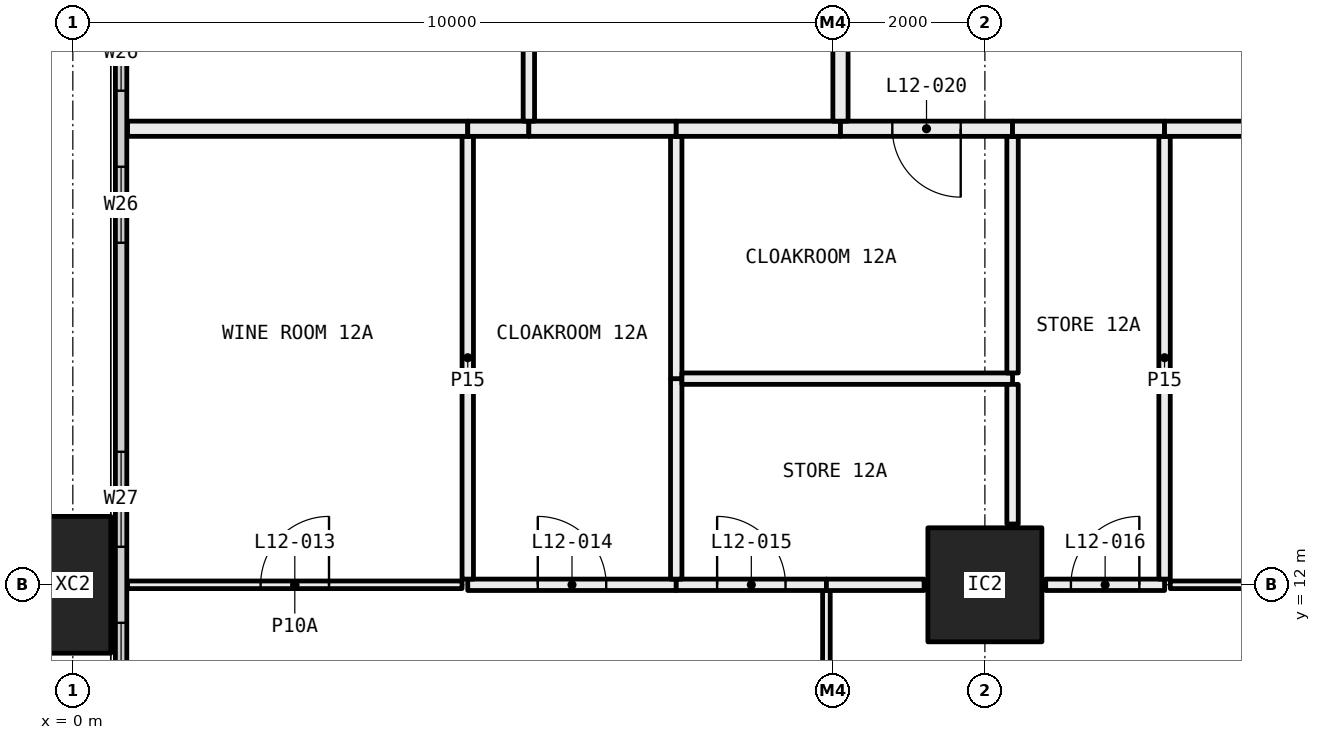
"""IFC4 building model, lengths in metres.
Left out: names, types, materials, properties, quantities, classifications, styles, units other than length and angle.
Written with IfcOpenShell. Run it as: python <this file> out.ifc"""

import sys

from ifc_helpers import new_model, si_unit, direction, frame, frame_2d, origin, origin_2d, place, context, subcontext, project, spatial, rectangle, hollow_rectangle, extrude, element, fill, save


model = new_model("IFC4")
c1 = context("Model", 3, precision=1e-05, world=origin(), true_north=direction((0.0, 1.0)))
c2 = subcontext(c1, "Body", "Model", "MODEL_VIEW")
j1 = project(units=[si_unit("LENGTHUNIT", "METRE"), si_unit("PLANEANGLEUNIT", "RADIAN")], contexts=[c1])
p1 = place(None, origin())
s1 = spatial("IfcSite", under=j1, at=p1, CompositionType="ELEMENT")
p2 = place(p1, origin())
s2 = spatial("IfcBuilding", under=s1, at=p2, CompositionType="ELEMENT")
p3 = place(p2, frame((0.0, 0.0, 54.15)))
s3 = spatial("IfcBuildingStorey", under=s2, at=p3, CompositionType="ELEMENT", Elevation=54.15)
p4 = place(p3, frame((0.0, 12.0, -0.4), z_axis=(0.0, 0.0, 1.0), x_axis=(0.0, 1.0, 0.0)))
e1 = element("IfcColumn", 1, at=p4, inside=s3, PredefinedType="COLUMN", context=c2, shape_type="SweptSolid", body=[
    extrude(hollow_rectangle(XDim=1.8, YDim=1.0, WallThickness=0.07, at=origin_2d()), origin(), (0.0, 0.0, 1.0), 3.45),
])
p5 = place(p3, frame((12.0, 12.0, 0.0), z_axis=(0.0, 0.0, 1.0), x_axis=(1.0, 0.0, 0.0)))
e2 = element("IfcColumn", 2, at=p5, inside=s3, PredefinedType="COLUMN", context=c2, shape_type="SweptSolid", body=[
    extrude(hollow_rectangle(XDim=1.5, YDim=1.5, WallThickness=0.065, at=origin_2d()), origin(), (0.0, 0.0, 1.0), 3.05),
])
p6 = place(p3, frame((0.635, 6.71, 0.0), z_axis=(0.0, 0.0, 1.0), x_axis=(0.0, 1.0, 0.0)))
e3 = element("IfcWall", 3, at=p6, inside=s3, PredefinedType="ELEMENTEDWALL", context=c2, shape_type="SweptSolid", body=[
    extrude(rectangle(XDim=34.58, YDim=0.15, at=frame_2d((17.29, 0.0))), origin(), (0.0, 0.0, 1.0), 3.05),
])
p7 = place(p6, frame((0.29, 0.0, 0.45)))
e4 = element("IfcOpeningElement", 4, at=p7, cuts=e3, PredefinedType="OPENING", context=c2, shape_type="SweptSolid", body=[
    extrude(rectangle(XDim=4.5, YDim=2.55, at=frame_2d((2.25, 1.275))), frame((0.0, 0.085, 0.0), z_axis=(0.0, -1.0, 0.0), x_axis=(1.0, 0.0, 0.0)), (0.0, 0.0, 1.0), 0.17),
])
p8 = place(p6, frame((5.79, 0.0, 0.45)))
e5 = element("IfcOpeningElement", 5, at=p8, cuts=e3, PredefinedType="OPENING", context=c2, shape_type="SweptSolid", body=[
    extrude(rectangle(XDim=1.25, YDim=2.55, at=frame_2d((0.625, 1.275))), frame((0.0, 0.085, 0.0), z_axis=(0.0, -1.0, 0.0), x_axis=(1.0, 0.0, 0.0)), (0.0, 0.0, 1.0), 0.17),
])
p9 = place(p6, frame((9.79, 0.0, 0.45)))
e6 = element("IfcOpeningElement", 6, at=p9, cuts=e3, PredefinedType="OPENING", context=c2, shape_type="SweptSolid", body=[
    extrude(rectangle(XDim=1.0, YDim=2.55, at=frame_2d((0.5, 1.275))), frame((0.0, 0.085, 0.0), z_axis=(0.0, -1.0, 0.0), x_axis=(1.0, 0.0, 0.0)), (0.0, 0.0, 1.0), 0.17),
])
p10 = place(p6, frame((11.79, 0.0, 0.45)))
e7 = element("IfcOpeningElement", 7, at=p10, cuts=e3, PredefinedType="OPENING", context=c2, shape_type="SweptSolid", body=[
    extrude(rectangle(XDim=1.0, YDim=2.55, at=frame_2d((0.5, 1.275))), frame((0.0, 0.085, 0.0), z_axis=(0.0, -1.0, 0.0), x_axis=(1.0, 0.0, 0.0)), (0.0, 0.0, 1.0), 0.17),
])
p11 = place(p6, frame((15.54, 0.0, 0.45)))
e8 = element("IfcOpeningElement", 8, at=p11, cuts=e3, PredefinedType="OPENING", context=c2, shape_type="SweptSolid", body=[
    extrude(rectangle(XDim=1.25, YDim=2.55, at=frame_2d((0.625, 1.275))), frame((0.0, 0.085, 0.0), z_axis=(0.0, -1.0, 0.0), x_axis=(1.0, 0.0, 0.0)), (0.0, 0.0, 1.0), 0.17),
])
p12 = place(p6, frame((17.79, 0.0, 0.45)))
e9 = element("IfcOpeningElement", 9, at=p12, cuts=e3, PredefinedType="OPENING", context=c2, shape_type="SweptSolid", body=[
    extrude(rectangle(XDim=1.25, YDim=2.55, at=frame_2d((0.625, 1.275))), frame((0.0, 0.085, 0.0), z_axis=(0.0, -1.0, 0.0), x_axis=(1.0, 0.0, 0.0)), (0.0, 0.0, 1.0), 0.17),
])
p13 = place(p6, frame((21.79, 0.0, 0.45)))
e10 = element("IfcOpeningElement", 10, at=p13, cuts=e3, PredefinedType="OPENING", context=c2, shape_type="SweptSolid", body=[
    extrude(rectangle(XDim=1.0, YDim=2.55, at=frame_2d((0.5, 1.275))), frame((0.0, 0.085, 0.0), z_axis=(0.0, -1.0, 0.0), x_axis=(1.0, 0.0, 0.0)), (0.0, 0.0, 1.0), 0.17),
])
p14 = place(p6, frame((23.79, 0.0, 0.45)))
e11 = element("IfcOpeningElement", 11, at=p14, cuts=e3, PredefinedType="OPENING", context=c2, shape_type="SweptSolid", body=[
    extrude(rectangle(XDim=1.0, YDim=2.55, at=frame_2d((0.5, 1.275))), frame((0.0, 0.085, 0.0), z_axis=(0.0, -1.0, 0.0), x_axis=(1.0, 0.0, 0.0)), (0.0, 0.0, 1.0), 0.17),
])
p15 = place(p6, frame((27.54, 0.0, 0.45)))
e12 = element("IfcOpeningElement", 12, at=p15, cuts=e3, PredefinedType="OPENING", context=c2, shape_type="SweptSolid", body=[
    extrude(rectangle(XDim=1.25, YDim=2.55, at=frame_2d((0.625, 1.275))), frame((0.0, 0.085, 0.0), z_axis=(0.0, -1.0, 0.0), x_axis=(1.0, 0.0, 0.0)), (0.0, 0.0, 1.0), 0.17),
])
p16 = place(p6, frame((29.79, 0.0, 0.45)))
e13 = element("IfcOpeningElement", 13, at=p16, cuts=e3, PredefinedType="OPENING", context=c2, shape_type="SweptSolid", body=[
    extrude(rectangle(XDim=4.5, YDim=2.55, at=frame_2d((2.25, 1.275))), frame((0.0, 0.085, 0.0), z_axis=(0.0, -1.0, 0.0), x_axis=(1.0, 0.0, 0.0)), (0.0, 0.0, 1.0), 0.17),
])
p17 = place(p3, frame((9.915, 6.05, 0.0), z_axis=(0.0, 0.0, 1.0), x_axis=(0.0, 1.0, 0.0)))
e14 = element("IfcWall", 14, at=p17, inside=s3, PredefinedType="PARTITIONING", context=c2, shape_type="SweptSolid", body=[
    extrude(rectangle(XDim=5.875, YDim=0.1, at=frame_2d((2.938, 0.0))), origin(), (0.0, 0.0, 1.0), 2.45),
])
p18 = place(p17, frame((2.488, 0.0, 0.0)))
e15 = element("IfcOpeningElement", 15, at=p18, cuts=e14, PredefinedType="OPENING", context=c2, shape_type="SweptSolid", body=[
    extrude(rectangle(XDim=0.9, YDim=2.1, at=frame_2d((0.45, 1.05))), frame((0.0, 0.06, 0.0), z_axis=(0.0, -1.0, 0.0), x_axis=(1.0, 0.0, 0.0)), (0.0, 0.0, 1.0), 0.12),
])
p19 = place(p3, frame((5.121, 12.0, 0.0), z_axis=(0.0, 0.0, 1.0), x_axis=(-1.0, 0.0, 0.0)))
e16 = element("IfcWall", 16, at=p19, inside=s3, PredefinedType="PARTITIONING", context=c2, shape_type="SweptSolid", body=[
    extrude(rectangle(XDim=4.401, YDim=0.1, at=frame_2d((2.201, 0.0))), origin(), (0.0, 0.0, 1.0), 2.45),
])
p20 = place(p19, frame((1.75, 0.0, 0.0)))
e17 = element("IfcOpeningElement", 17, at=p20, cuts=e16, PredefinedType="OPENING", context=c2, shape_type="SweptSolid", body=[
    extrude(rectangle(XDim=0.9, YDim=2.1, at=frame_2d((0.45, 1.05))), frame((0.0, 0.06, 0.0), z_axis=(0.0, -1.0, 0.0), x_axis=(1.0, 0.0, 0.0)), (0.0, 0.0, 1.0), 0.12),
])
p21 = place(p3, frame((7.939, 12.0, 0.0), z_axis=(0.0, 0.0, 1.0), x_axis=(-1.0, 0.0, 0.0)))
e18 = element("IfcWall", 18, at=p21, inside=s3, PredefinedType="PARTITIONING", context=c2, shape_type="SweptSolid", body=[
    extrude(rectangle(XDim=2.743, YDim=0.15, at=frame_2d((1.372, 0.0))), origin(), (0.0, 0.0, 1.0), 2.45),
])
p22 = place(p21, frame((0.921, 0.0, 0.0)))
e19 = element("IfcOpeningElement", 19, at=p22, cuts=e18, PredefinedType="OPENING", context=c2, shape_type="SweptSolid", body=[
    extrude(rectangle(XDim=0.9, YDim=2.1, at=frame_2d((0.45, 1.05))), frame((0.0, 0.085, 0.0), z_axis=(0.0, -1.0, 0.0), x_axis=(1.0, 0.0, 0.0)), (0.0, 0.0, 1.0), 0.17),
])
p23 = place(p3, frame((9.915, 12.0, 0.0), z_axis=(0.0, 0.0, 1.0), x_axis=(-1.0, 0.0, 0.0)))
e20 = element("IfcWall", 20, at=p23, inside=s3, PredefinedType="PARTITIONING", context=c2, shape_type="SweptSolid", body=[
    extrude(rectangle(XDim=1.976, YDim=0.15, at=frame_2d((0.988, 0.0))), origin(), (0.0, 0.0, 1.0), 2.45),
])
p24 = place(p23, frame((0.538, 0.0, 0.0)))
e21 = element("IfcOpeningElement", 21, at=p24, cuts=e20, PredefinedType="OPENING", context=c2, shape_type="SweptSolid", body=[
    extrude(rectangle(XDim=0.9, YDim=2.1, at=frame_2d((0.45, 1.05))), frame((0.0, 0.085, 0.0), z_axis=(0.0, -1.0, 0.0), x_axis=(1.0, 0.0, 0.0)), (0.0, 0.0, 1.0), 0.17),
])
p25 = place(p3, frame((11.2, 12.0, 0.0), z_axis=(0.0, 0.0, 1.0), x_axis=(-1.0, 0.0, 0.0)))
e22 = element("IfcWall", 22, at=p25, inside=s3, PredefinedType="PARTITIONING", context=c2, shape_type="SweptSolid", body=[
    extrude(rectangle(XDim=1.285, YDim=0.15, at=frame_2d((0.643, 0.0))), origin(), (0.0, 0.0, 1.0), 2.45),
])
p26 = place(p3, frame((14.364, 12.0, 0.0), z_axis=(0.0, 0.0, 1.0), x_axis=(-1.0, 0.0, 0.0)))
e23 = element("IfcWall", 23, at=p26, inside=s3, PredefinedType="PARTITIONING", context=c2, shape_type="SweptSolid", body=[
    extrude(rectangle(XDim=1.564, YDim=0.15, at=frame_2d((0.782, 0.0))), origin(), (0.0, 0.0, 1.0), 2.45),
])
p27 = place(p26, frame((0.332, 0.0, 0.0)))
e24 = element("IfcOpeningElement", 24, at=p27, cuts=e23, PredefinedType="OPENING", context=c2, shape_type="SweptSolid", body=[
    extrude(rectangle(XDim=0.9, YDim=2.1, at=frame_2d((0.45, 1.05))), frame((0.0, 0.085, 0.0), z_axis=(0.0, -1.0, 0.0), x_axis=(1.0, 0.0, 0.0)), (0.0, 0.0, 1.0), 0.17),
])
p28 = place(p3, frame((19.06, 12.0, 0.0), z_axis=(0.0, 0.0, 1.0), x_axis=(-1.0, 0.0, 0.0)))
e25 = element("IfcWall", 25, at=p28, inside=s3, PredefinedType="PARTITIONING", context=c2, shape_type="SweptSolid", body=[
    extrude(rectangle(XDim=4.621, YDim=0.1, at=frame_2d((2.311, 0.0))), origin(), (0.0, 0.0, 1.0), 2.45),
])
p29 = place(p3, frame((5.196, 12.075, 0.0), z_axis=(0.0, 0.0, 1.0), x_axis=(0.0, 1.0, 0.0)))
e26 = element("IfcWall", 26, at=p29, inside=s3, PredefinedType="PARTITIONING", context=c2, shape_type="SweptSolid", body=[
    extrude(rectangle(XDim=5.825, YDim=0.15, at=frame_2d((2.913, 0.0))), origin(), (0.0, 0.0, 1.0), 2.45),
])
p30 = place(p3, frame((5.196, 18.0, 0.0), z_axis=(0.0, 0.0, 1.0), x_axis=(-1.0, 0.0, 0.0)))
e27 = element("IfcWall", 27, at=p30, inside=s3, PredefinedType="PARTITIONING", context=c2, shape_type="SweptSolid", body=[
    extrude(rectangle(XDim=4.476, YDim=0.2, at=frame_2d((2.238, 0.0))), origin(), (0.0, 0.0, 1.0), 3.05),
])
p31 = place(p3, frame((7.939, 12.075, 0.0), z_axis=(0.0, 0.0, 1.0), x_axis=(0.0, 1.0, 0.0)))
e28 = element("IfcWall", 28, at=p31, inside=s3, PredefinedType="PARTITIONING", context=c2, shape_type="SweptSolid", body=[
    extrude(rectangle(XDim=2.637, YDim=0.15, at=frame_2d((1.318, 0.0))), origin(), (0.0, 0.0, 1.0), 2.45),
])
p32 = place(p3, frame((7.939, 14.712, 0.0), z_axis=(0.0, 0.0, 1.0), x_axis=(0.0, 1.0, 0.0)))
e29 = element("IfcWall", 29, at=p32, inside=s3, PredefinedType="PARTITIONING", context=c2, shape_type="SweptSolid", body=[
    extrude(rectangle(XDim=3.188, YDim=0.15, at=frame_2d((1.594, 0.0))), origin(), (0.0, 0.0, 1.0), 3.05),
])
p33 = place(p3, frame((6.0, 18.0, 0.0), z_axis=(0.0, 0.0, 1.0), x_axis=(-1.0, 0.0, 0.0)))
e30 = element("IfcWall", 30, at=p33, inside=s3, PredefinedType="PARTITIONING", context=c2, shape_type="SweptSolid", body=[
    extrude(rectangle(XDim=0.804, YDim=0.2, at=frame_2d((0.402, 0.0))), origin(), (0.0, 0.0, 1.0), 3.05),
])
p34 = place(p3, frame((7.939, 18.0, 0.0), z_axis=(0.0, 0.0, 1.0), x_axis=(-1.0, 0.0, 0.0)))
e31 = element("IfcWall", 31, at=p34, inside=s3, PredefinedType="PARTITIONING", context=c2, shape_type="SweptSolid", body=[
    extrude(rectangle(XDim=1.939, YDim=0.2, at=frame_2d((0.969, 0.0))), origin(), (0.0, 0.0, 1.0), 3.05),
])
p35 = place(p3, frame((12.364, 14.712, 0.0), z_axis=(0.0, 0.0, 1.0), x_axis=(-1.0, 0.0, 0.0)))
e32 = element("IfcWall", 32, at=p35, inside=s3, PredefinedType="PARTITIONING", context=c2, shape_type="SweptSolid", body=[
    extrude(rectangle(XDim=4.35, YDim=0.15, at=frame_2d((2.175, 0.0))), origin(), (0.0, 0.0, 1.0), 3.05),
])
p36 = place(p3, frame((12.364, 12.8, 0.0), z_axis=(0.0, 0.0, 1.0), x_axis=(0.0, 1.0, 0.0)))
e33 = element("IfcWall", 33, at=p36, inside=s3, PredefinedType="PARTITIONING", context=c2, shape_type="SweptSolid", body=[
    extrude(rectangle(XDim=1.837, YDim=0.15, at=frame_2d((0.918, 0.0))), origin(), (0.0, 0.0, 1.0), 3.05),
])
p37 = place(p3, frame((12.364, 14.787, 0.0), z_axis=(0.0, 0.0, 1.0), x_axis=(0.0, 1.0, 0.0)))
e34 = element("IfcWall", 34, at=p37, inside=s3, PredefinedType="PARTITIONING", context=c2, shape_type="SweptSolid", body=[
    extrude(rectangle(XDim=3.113, YDim=0.15, at=frame_2d((1.556, 0.0))), origin(), (0.0, 0.0, 1.0), 3.05),
])
p38 = place(p3, frame((10.1, 18.0, 0.0), z_axis=(0.0, 0.0, 1.0), x_axis=(-1.0, 0.0, 0.0)))
e35 = element("IfcWall", 35, at=p38, inside=s3, PredefinedType="PARTITIONING", context=c2, shape_type="SweptSolid", body=[
    extrude(rectangle(XDim=2.161, YDim=0.2, at=frame_2d((1.081, 0.0))), origin(), (0.0, 0.0, 1.0), 3.05),
])
p39 = place(p3, frame((12.364, 18.0, 0.0), z_axis=(0.0, 0.0, 1.0), x_axis=(-1.0, 0.0, 0.0)))
e36 = element("IfcWall", 36, at=p39, inside=s3, PredefinedType="PARTITIONING", context=c2, shape_type="SweptSolid", body=[
    extrude(rectangle(XDim=2.264, YDim=0.2, at=frame_2d((1.132, 0.0))), origin(), (0.0, 0.0, 1.0), 3.05),
])
p40 = place(p39, frame((0.682, 0.0, 0.0)))
e37 = element("IfcOpeningElement", 37, at=p40, cuts=e36, PredefinedType="OPENING", context=c2, shape_type="SweptSolid", body=[
    extrude(rectangle(XDim=0.9, YDim=2.1, at=frame_2d((0.45, 1.05))), frame((0.0, 0.11, 0.0), z_axis=(0.0, -1.0, 0.0), x_axis=(1.0, 0.0, 0.0)), (0.0, 0.0, 1.0), 0.22),
])
p41 = place(p3, frame((14.364, 12.075, 0.0), z_axis=(0.0, 0.0, 1.0), x_axis=(0.0, 1.0, 0.0)))
e38 = element("IfcWall", 38, at=p41, inside=s3, PredefinedType="PARTITIONING", context=c2, shape_type="SweptSolid", body=[
    extrude(rectangle(XDim=5.825, YDim=0.15, at=frame_2d((2.913, 0.0))), origin(), (0.0, 0.0, 1.0), 2.45),
])
p42 = place(p3, frame((14.364, 18.0, 0.0), z_axis=(0.0, 0.0, 1.0), x_axis=(-1.0, 0.0, 0.0)))
e39 = element("IfcWall", 39, at=p42, inside=s3, PredefinedType="PARTITIONING", context=c2, shape_type="SweptSolid", body=[
    extrude(rectangle(XDim=2.0, YDim=0.2, at=frame_2d((1.0, 0.0))), origin(), (0.0, 0.0, 1.0), 3.05),
])
p43 = place(p3, frame((19.5, 18.0, 0.0), z_axis=(0.0, 0.0, 1.0), x_axis=(-1.0, 0.0, 0.0)))
e40 = element("IfcWall", 40, at=p43, inside=s3, PredefinedType="PARTITIONING", context=c2, shape_type="SweptSolid", body=[
    extrude(rectangle(XDim=5.136, YDim=0.2, at=frame_2d((2.568, 0.0))), origin(), (0.0, 0.0, 1.0), 3.05),
])
p44 = place(p3, frame((6.0, 18.1, 0.0), z_axis=(0.0, 0.0, 1.0), x_axis=(0.0, 1.0, 0.0)))
e41 = element("IfcWall", 41, at=p44, inside=s3, PredefinedType="PARTITIONING", context=c2, shape_type="SweptSolid", body=[
    extrude(rectangle(XDim=4.4, YDim=0.15, at=frame_2d((2.2, 0.0))), origin(), (0.0, 0.0, 1.0), 3.05),
])
p45 = place(p44, frame((1.75, 0.0, 0.0)))
e42 = element("IfcOpeningElement", 42, at=p45, cuts=e41, PredefinedType="OPENING", context=c2, shape_type="SweptSolid", body=[
    extrude(rectangle(XDim=0.9, YDim=2.1, at=frame_2d((0.45, 1.05))), frame((0.0, 0.085, 0.0), z_axis=(0.0, -1.0, 0.0), x_axis=(1.0, 0.0, 0.0)), (0.0, 0.0, 1.0), 0.17),
])
p46 = place(p3, frame((10.1, 18.1, 0.0), z_axis=(0.0, 0.0, 1.0), x_axis=(0.0, 1.0, 0.0)))
e43 = element("IfcWall", 43, at=p46, inside=s3, PredefinedType="PARTITIONING", context=c2, shape_type="SweptSolid", body=[
    extrude(rectangle(XDim=4.4, YDim=0.2, at=frame_2d((2.2, 0.0))), origin(), (0.0, 0.0, 1.0), 3.05),
])
p47 = place(p7, origin())
e44 = element("IfcWindow", 44, at=p47, inside=s3, PartitioningType="SINGLE_PANEL", PredefinedType="WINDOW", context=c2, shape_type="SweptSolid", body=[
    extrude(rectangle(XDim=4.5, YDim=2.55, at=frame_2d((2.25, 1.275))), frame((0.0, 0.03, 0.0), z_axis=(0.0, -1.0, 0.0), x_axis=(1.0, 0.0, 0.0)), (0.0, 0.0, 1.0), 0.06),
])
fill(e4, e44)
p48 = place(p8, origin())
e45 = element("IfcWindow", 45, at=p48, inside=s3, PartitioningType="SINGLE_PANEL", PredefinedType="WINDOW", context=c2, shape_type="SweptSolid", body=[
    extrude(rectangle(XDim=1.25, YDim=2.55, at=frame_2d((0.625, 1.275))), frame((0.0, 0.03, 0.0), z_axis=(0.0, -1.0, 0.0), x_axis=(1.0, 0.0, 0.0)), (0.0, 0.0, 1.0), 0.06),
])
fill(e5, e45)
p49 = place(p9, origin())
e46 = element("IfcWindow", 46, at=p49, inside=s3, PartitioningType="SINGLE_PANEL", PredefinedType="WINDOW", context=c2, shape_type="SweptSolid", body=[
    extrude(rectangle(XDim=1.0, YDim=2.55, at=frame_2d((0.5, 1.275))), frame((0.0, 0.03, 0.0), z_axis=(0.0, -1.0, 0.0), x_axis=(1.0, 0.0, 0.0)), (0.0, 0.0, 1.0), 0.06),
])
fill(e6, e46)
p50 = place(p10, origin())
e47 = element("IfcWindow", 47, at=p50, inside=s3, PartitioningType="SINGLE_PANEL", PredefinedType="WINDOW", context=c2, shape_type="SweptSolid", body=[
    extrude(rectangle(XDim=1.0, YDim=2.55, at=frame_2d((0.5, 1.275))), frame((0.0, 0.03, 0.0), z_axis=(0.0, -1.0, 0.0), x_axis=(1.0, 0.0, 0.0)), (0.0, 0.0, 1.0), 0.06),
])
fill(e7, e47)
p51 = place(p20, frame((0.9, 0.0, 0.0), x_axis=(-1.0, 0.0, 0.0)))
e48 = element("IfcDoor", 48, at=p51, inside=s3, OperationType="SINGLE_SWING_LEFT", PredefinedType="DOOR", context=c2, shape_type="SweptSolid", body=[
    extrude(rectangle(XDim=0.9, YDim=2.1, at=frame_2d((0.45, 1.05))), frame((0.0, 0.025, 0.0), z_axis=(0.0, -1.0, 0.0), x_axis=(1.0, 0.0, 0.0)), (0.0, 0.0, 1.0), 0.05),
])
fill(e17, e48)
p52 = place(p22, frame((0.9, 0.0, 0.0), x_axis=(-1.0, 0.0, 0.0)))
e49 = element("IfcDoor", 49, at=p52, inside=s3, OperationType="SINGLE_SWING_RIGHT", PredefinedType="DOOR", context=c2, shape_type="SweptSolid", body=[
    extrude(rectangle(XDim=0.9, YDim=2.1, at=frame_2d((0.45, 1.05))), frame((0.0, 0.025, 0.0), z_axis=(0.0, -1.0, 0.0), x_axis=(1.0, 0.0, 0.0)), (0.0, 0.0, 1.0), 0.05),
])
fill(e19, e49)
p53 = place(p24, frame((0.9, 0.0, 0.0), x_axis=(-1.0, 0.0, 0.0)))
e50 = element("IfcDoor", 50, at=p53, inside=s3, OperationType="SINGLE_SWING_RIGHT", PredefinedType="DOOR", context=c2, shape_type="SweptSolid", body=[
    extrude(rectangle(XDim=0.9, YDim=2.1, at=frame_2d((0.45, 1.05))), frame((0.0, 0.025, 0.0), z_axis=(0.0, -1.0, 0.0), x_axis=(1.0, 0.0, 0.0)), (0.0, 0.0, 1.0), 0.05),
])
fill(e21, e50)
p54 = place(p27, frame((0.9, 0.0, 0.0), x_axis=(-1.0, 0.0, 0.0)))
e51 = element("IfcDoor", 51, at=p54, inside=s3, OperationType="SINGLE_SWING_LEFT", PredefinedType="DOOR", context=c2, shape_type="SweptSolid", body=[
    extrude(rectangle(XDim=0.9, YDim=2.1, at=frame_2d((0.45, 1.05))), frame((0.0, 0.025, 0.0), z_axis=(0.0, -1.0, 0.0), x_axis=(1.0, 0.0, 0.0)), (0.0, 0.0, 1.0), 0.05),
])
fill(e24, e51)
p55 = place(p40, origin())
e52 = element("IfcDoor", 52, at=p55, inside=s3, OperationType="SINGLE_SWING_RIGHT", PredefinedType="DOOR", context=c2, shape_type="SweptSolid", body=[
    extrude(rectangle(XDim=0.9, YDim=2.1, at=frame_2d((0.45, 1.05))), frame((0.0, 0.025, 0.0), z_axis=(0.0, -1.0, 0.0), x_axis=(1.0, 0.0, 0.0)), (0.0, 0.0, 1.0), 0.05),
])
fill(e37, e52)
save(model, sys.argv[1])
